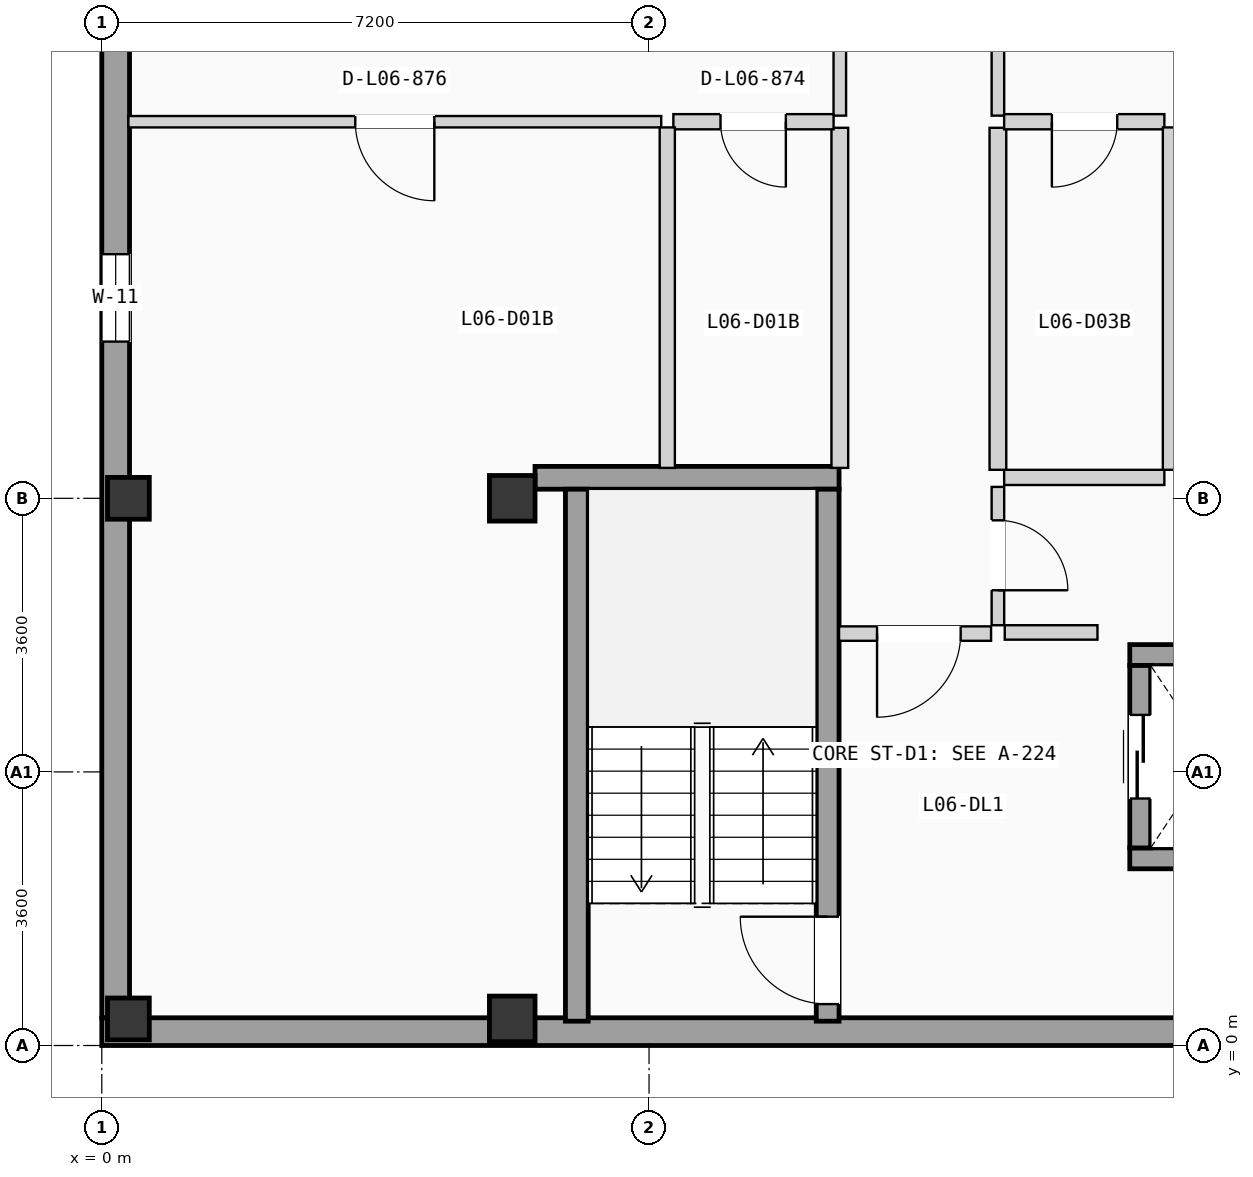
"""IFC4 building model, lengths in metres.
Left out: names, types, materials, properties, quantities, classifications, styles, units other than length and angle.
Written with IfcOpenShell. Run it as: python <this file> out.ifc"""

import sys

from ifc_helpers import new_model, si_unit, direction, frame, frame_2d, origin, origin_2d, place, context, subcontext, project, spatial, rectangle, extrude, element, fill, save


model = new_model("IFC4")
c1 = context("Model", 3, precision=1e-05, world=origin(), true_north=direction((0.0, 1.0)))
c2 = subcontext(c1, "Body", "Model", "MODEL_VIEW")
j1 = project(units=[si_unit("LENGTHUNIT", "METRE"), si_unit("PLANEANGLEUNIT", "RADIAN")], contexts=[c1])
p1 = place(None, origin())
s1 = spatial("IfcSite", under=j1, at=p1, CompositionType="ELEMENT")
p2 = place(p1, origin())
s2 = spatial("IfcBuilding", under=s1, at=p2, CompositionType="ELEMENT")
p3 = place(p2, frame((0.0, 0.0, 21.525)))
s3 = spatial("IfcBuildingStorey", under=s2, at=p3, CompositionType="ELEMENT", Elevation=21.525)
for number, where, z_axis, x_axis in (
    (1, (0.35, 0.35, 0.0), (0.0, 0.0, 1.0), (1.0, 0.0, 0.0)),
    (2, (0.35, 7.2, 0.0), (0.0, 0.0, 1.0), (1.0, 0.0, 0.0)),
):
    element("IfcColumn", number, at=place(p3, frame(where, z_axis=z_axis, x_axis=x_axis)), inside=s3, PredefinedType="COLUMN", context=c2, shape_type="SweptSolid", body=[
        extrude(rectangle(XDim=0.55, YDim=0.55, at=origin_2d()), origin(), (0.0, 0.0, 1.0), 3.15),
    ])
for number, where, z_axis, x_axis in (
    (3, (5.4, 0.35, 0.0), (0.0, 0.0, 1.0), (1.0, 0.0, 0.0)),
    (4, (5.4, 7.2, 0.0), (0.0, 0.0, 1.0), (1.0, 0.0, 0.0)),
):
    element("IfcColumn", number, at=place(p3, frame(where, z_axis=z_axis, x_axis=x_axis)), inside=s3, PredefinedType="COLUMN", context=c2, shape_type="SweptSolid", body=[
        extrude(rectangle(XDim=0.6, YDim=0.6, at=origin_2d()), origin(), (0.0, 0.0, 1.0), 3.15),
    ])
p4 = place(p3, frame((0.0, 0.183, 0.0), z_axis=(0.0, 0.0, 1.0), x_axis=(1.0, 0.0, 0.0)))
e5 = element("IfcWall", 5, at=p4, inside=s3, PredefinedType="SOLIDWALL", context=c2, shape_type="SweptSolid", body=[
    extrude(rectangle(XDim=21.6, YDim=0.365, at=frame_2d((10.8, 0.0))), origin(), (0.0, 0.0, 1.0), 2.89),
])
p5 = place(p3, frame((0.183, 0.365, 0.0), z_axis=(0.0, 0.0, 1.0), x_axis=(0.0, 1.0, 0.0)))
e6 = element("IfcWall", 6, at=p5, inside=s3, PredefinedType="SOLIDWALL", context=c2, shape_type="SweptSolid", body=[
    extrude(rectangle(XDim=49.67, YDim=0.365, at=frame_2d((24.835, 0.0))), origin(), (0.0, 0.0, 1.0), 2.89),
])
p6 = place(p5, frame((15.325, 0.0, 0.85)))
e7 = element("IfcOpeningElement", 7, at=p6, cuts=e6, PredefinedType="OPENING", context=c2, shape_type="SweptSolid", body=[
    extrude(rectangle(XDim=0.95, YDim=1.2, at=frame_2d((0.475, 0.6))), frame((0.0, 0.192, 0.0), z_axis=(0.0, -1.0, 0.0), x_axis=(1.0, 0.0, 0.0)), (0.0, 0.0, 1.0), 0.385),
])
p7 = place(p5, frame((8.897, 0.0, 0.9)))
e8 = element("IfcOpeningElement", 8, at=p7, cuts=e6, PredefinedType="OPENING", context=c2, shape_type="SweptSolid", body=[
    extrude(rectangle(XDim=1.15, YDim=1.2, at=frame_2d((0.575, 0.6))), frame((0.0, 0.192, 0.0), z_axis=(0.0, -1.0, 0.0), x_axis=(1.0, 0.0, 0.0)), (0.0, 0.0, 1.0), 0.385),
])
p8 = place(p5, frame((18.635, 0.0, 0.855)))
e9 = element("IfcOpeningElement", 9, at=p8, cuts=e6, PredefinedType="OPENING", context=c2, shape_type="SweptSolid", body=[
    extrude(rectangle(XDim=1.15, YDim=1.35, at=frame_2d((0.575, 0.675))), frame((0.0, 0.192, 0.0), z_axis=(0.0, -1.0, 0.0), x_axis=(1.0, 0.0, 0.0)), (0.0, 0.0, 1.0), 0.385),
])
p9 = place(p5, frame((31.46, 0.0, 0.705)))
e10 = element("IfcOpeningElement", 10, at=p9, cuts=e6, PredefinedType="OPENING", context=c2, shape_type="SweptSolid", body=[
    extrude(rectangle(XDim=1.15, YDim=1.5, at=frame_2d((0.575, 0.75))), frame((0.0, 0.192, 0.0), z_axis=(0.0, -1.0, 0.0), x_axis=(1.0, 0.0, 0.0)), (0.0, 0.0, 1.0), 0.385),
])
p10 = place(p5, frame((24.562, 0.0, 0.555)))
e11 = element("IfcOpeningElement", 11, at=p10, cuts=e6, PredefinedType="OPENING", context=c2, shape_type="SweptSolid", body=[
    extrude(rectangle(XDim=1.15, YDim=1.65, at=frame_2d((0.575, 0.825))), frame((0.0, 0.192, 0.0), z_axis=(0.0, -1.0, 0.0), x_axis=(1.0, 0.0, 0.0)), (0.0, 0.0, 1.0), 0.385),
])
p11 = place(p5, frame((38.695, 0.0, 0.85)))
e12 = element("IfcOpeningElement", 12, at=p11, cuts=e6, PredefinedType="OPENING", context=c2, shape_type="SweptSolid", body=[
    extrude(rectangle(XDim=0.95, YDim=1.2, at=frame_2d((0.475, 0.6))), frame((0.0, 0.192, 0.0), z_axis=(0.0, -1.0, 0.0), x_axis=(1.0, 0.0, 0.0)), (0.0, 0.0, 1.0), 0.385),
])
p12 = place(p3, frame((5.7, 7.47, 0.0), z_axis=(0.0, 0.0, 1.0), x_axis=(1.0, 0.0, 0.0)))
e13 = element("IfcWall", 13, at=p12, inside=s3, PredefinedType="SHEAR", context=c2, shape_type="SweptSolid", body=[
    extrude(rectangle(XDim=4.0, YDim=0.3, at=frame_2d((2.0, 0.0))), origin(), (0.0, 0.0, 1.0), 2.89),
])
p13 = place(p3, frame((6.25, 0.32, 0.0), z_axis=(0.0, 0.0, 1.0), x_axis=(0.0, 1.0, 0.0)))
e14 = element("IfcWall", 14, at=p13, inside=s3, PredefinedType="SHEAR", context=c2, shape_type="SweptSolid", body=[
    extrude(rectangle(XDim=7.0, YDim=0.3, at=frame_2d((3.5, 0.0))), origin(), (0.0, 0.0, 1.0), 2.89),
])
p14 = place(p3, frame((9.55, 0.32, 0.0), z_axis=(0.0, 0.0, 1.0), x_axis=(0.0, 1.0, 0.0)))
e15 = element("IfcWall", 15, at=p14, inside=s3, PredefinedType="SHEAR", context=c2, shape_type="SweptSolid", body=[
    extrude(rectangle(XDim=7.0, YDim=0.3, at=frame_2d((3.5, 0.0))), origin(), (0.0, 0.0, 1.0), 2.89),
])
p15 = place(p14, frame((0.225, 0.0, 0.0)))
e16 = element("IfcOpeningElement", 16, at=p15, cuts=e15, PredefinedType="OPENING", context=c2, shape_type="SweptSolid", body=[
    extrude(rectangle(XDim=1.15, YDim=2.12, at=frame_2d((0.575, 1.06))), frame((0.0, 0.16, 0.0), z_axis=(0.0, -1.0, 0.0), x_axis=(1.0, 0.0, 0.0)), (0.0, 0.0, 1.0), 0.32),
])
for number, where, z_axis, x_axis in (
    (17, (13.525, 2.462, 0.0), (0.0, 0.0, 1.0), (1.0, 0.0, 0.0)),
    (18, (13.525, 5.137, 0.0), (0.0, 0.0, 1.0), (1.0, 0.0, 0.0)),
):
    element("IfcWall", number, at=place(p3, frame(where, z_axis=z_axis, x_axis=x_axis)), inside=s3, PredefinedType="SHEAR", context=c2, shape_type="SweptSolid", body=[
        extrude(rectangle(XDim=2.15, YDim=0.275, at=frame_2d((1.075, 0.0))), origin(), (0.0, 0.0, 1.0), 2.89),
    ])
p16 = place(p3, frame((13.663, 2.6, 0.0), z_axis=(0.0, 0.0, 1.0), x_axis=(0.0, 1.0, 0.0)))
e19 = element("IfcWall", 19, at=p16, inside=s3, PredefinedType="SHEAR", context=c2, shape_type="SweptSolid", body=[
    extrude(rectangle(XDim=2.4, YDim=0.275, at=frame_2d((1.2, 0.0))), origin(), (0.0, 0.0, 1.0), 2.89),
])
p17 = place(p16, frame((0.65, 0.0, 0.0)))
e20 = element("IfcOpeningElement", 20, at=p17, cuts=e19, PredefinedType="OPENING", context=c2, shape_type="SweptSolid", body=[
    extrude(rectangle(XDim=1.1, YDim=2.15, at=frame_2d((0.55, 1.075))), frame((0.0, 0.147, 0.0), z_axis=(0.0, -1.0, 0.0), x_axis=(1.0, 0.0, 0.0)), (0.0, 0.0, 1.0), 0.295),
])
p18 = place(p3, frame((11.88, 5.435, 0.0), z_axis=(0.0, 0.0, 1.0), x_axis=(1.0, 0.0, 0.0)))
e21 = element("IfcWall", 21, at=p18, inside=s3, PredefinedType="PARTITIONING", context=c2, shape_type="SweptSolid", body=[
    extrude(rectangle(XDim=1.22, YDim=0.19, at=frame_2d((0.61, 0.0))), origin(), (0.0, 0.0, 1.0), 2.87),
])
p19 = place(p3, frame((9.7, 5.42, 0.0), z_axis=(0.0, 0.0, 1.0), x_axis=(1.0, 0.0, 0.0)))
e22 = element("IfcWall", 22, at=p19, inside=s3, PredefinedType="PARTITIONING", context=c2, shape_type="SweptSolid", body=[
    extrude(rectangle(XDim=2.0, YDim=0.19, at=frame_2d((1.0, 0.0))), origin(), (0.0, 0.0, 1.0), 2.87),
])
p20 = place(p19, frame((0.5, 0.0, 0.0)))
e23 = element("IfcOpeningElement", 23, at=p20, cuts=e22, PredefinedType="OPENING", context=c2, shape_type="SweptSolid", body=[
    extrude(rectangle(XDim=1.1, YDim=2.12, at=frame_2d((0.55, 1.06))), frame((0.0, 0.105, 0.0), z_axis=(0.0, -1.0, 0.0), x_axis=(1.0, 0.0, 0.0)), (0.0, 0.0, 1.0), 0.21),
])
p21 = place(p3, frame((11.79, 5.53, 0.0), z_axis=(0.0, 0.0, 1.0), x_axis=(0.0, 1.0, 0.0)))
e24 = element("IfcWall", 24, at=p21, inside=s3, PredefinedType="PARTITIONING", context=c2, shape_type="SweptSolid", body=[
    extrude(rectangle(XDim=1.82, YDim=0.165, at=frame_2d((0.91, 0.0))), origin(), (0.0, 0.0, 1.0), 2.87),
])
p22 = place(p21, frame((0.46, 0.0, 0.0)))
e25 = element("IfcOpeningElement", 25, at=p22, cuts=e24, PredefinedType="OPENING", context=c2, shape_type="SweptSolid", body=[
    extrude(rectangle(XDim=0.92, YDim=2.04, at=frame_2d((0.46, 1.02))), frame((0.0, 0.093, 0.0), z_axis=(0.0, -1.0, 0.0), x_axis=(1.0, 0.0, 0.0)), (0.0, 0.0, 1.0), 0.185),
])
p23 = place(p3, frame((11.872, 7.475, 0.0), z_axis=(0.0, 0.0, 1.0), x_axis=(1.0, 0.0, 0.0)))
e26 = element("IfcWall", 26, at=p23, inside=s3, PredefinedType="PLUMBINGWALL", context=c2, shape_type="SweptSolid", body=[
    extrude(rectangle(XDim=2.108, YDim=0.2, at=frame_2d((1.054, 0.0))), origin(), (0.0, 0.0, 1.0), 2.87),
])
p24 = place(p3, frame((9.71, 12.235, 0.0), z_axis=(0.0, 0.0, 1.0), x_axis=(0.0, 1.0, 0.0)))
e27 = element("IfcWall", 27, at=p24, inside=s3, PredefinedType="PARTITIONING", context=c2, shape_type="SweptSolid", body=[
    extrude(rectangle(XDim=5.424, YDim=0.165, at=frame_2d((2.712, 0.0))), origin(), (0.0, 0.0, 1.0), 2.87),
])
p25 = place(p24, frame((2.187, 0.0, 0.0)))
e28 = element("IfcOpeningElement", 28, at=p25, cuts=e27, PredefinedType="OPENING", context=c2, shape_type="SweptSolid", body=[
    extrude(rectangle(XDim=1.05, YDim=2.13, at=frame_2d((0.525, 1.065))), frame((0.0, 0.093, 0.0), z_axis=(0.0, -1.0, 0.0), x_axis=(1.0, 0.0, 0.0)), (0.0, 0.0, 1.0), 0.185),
])
p26 = place(p3, frame((9.71, 7.6, 0.0), z_axis=(0.0, 0.0, 1.0), x_axis=(0.0, 1.0, 0.0)))
e29 = element("IfcWall", 29, at=p26, inside=s3, PredefinedType="PLUMBINGWALL", context=c2, shape_type="SweptSolid", body=[
    extrude(rectangle(XDim=4.475, YDim=0.22, at=frame_2d((2.237, 0.0))), origin(), (0.0, 0.0, 1.0), 2.87),
])
p27 = place(p3, frame((11.79, 12.235, 0.0), z_axis=(0.0, 0.0, 1.0), x_axis=(0.0, 1.0, 0.0)))
e30 = element("IfcWall", 30, at=p27, inside=s3, PredefinedType="PARTITIONING", context=c2, shape_type="SweptSolid", body=[
    extrude(rectangle(XDim=5.424, YDim=0.165, at=frame_2d((2.712, 0.0))), origin(), (0.0, 0.0, 1.0), 2.87),
])
p28 = place(p27, frame((2.187, 0.0, 0.0)))
e31 = element("IfcOpeningElement", 31, at=p28, cuts=e30, PredefinedType="OPENING", context=c2, shape_type="SweptSolid", body=[
    extrude(rectangle(XDim=1.05, YDim=2.13, at=frame_2d((0.525, 1.065))), frame((0.0, 0.093, 0.0), z_axis=(0.0, -1.0, 0.0), x_axis=(1.0, 0.0, 0.0)), (0.0, 0.0, 1.0), 0.185),
])
p29 = place(p3, frame((11.79, 7.575, 0.0), z_axis=(0.0, 0.0, 1.0), x_axis=(0.0, 1.0, 0.0)))
e32 = element("IfcWall", 32, at=p29, inside=s3, PredefinedType="PLUMBINGWALL", context=c2, shape_type="SweptSolid", body=[
    extrude(rectangle(XDim=4.5, YDim=0.22, at=frame_2d((2.25, 0.0))), origin(), (0.0, 0.0, 1.0), 2.87),
])
p30 = place(p3, frame((7.52, 12.155, 0.0), z_axis=(0.0, 0.0, 1.0), x_axis=(1.0, 0.0, 0.0)))
e33 = element("IfcWall", 33, at=p30, inside=s3, PredefinedType="PLUMBINGWALL", context=c2, shape_type="SweptSolid", body=[
    extrude(rectangle(XDim=2.108, YDim=0.2, at=frame_2d((1.054, 0.0))), origin(), (0.0, 0.0, 1.0), 2.87),
])
p31 = place(p30, frame((0.62, 0.0, 0.0)))
e34 = element("IfcOpeningElement", 34, at=p31, cuts=e33, PredefinedType="OPENING", context=c2, shape_type="SweptSolid", body=[
    extrude(rectangle(XDim=0.86, YDim=2.0, at=frame_2d((0.43, 1.0))), frame((0.0, 0.11, 0.0), z_axis=(0.0, -1.0, 0.0), x_axis=(1.0, 0.0, 0.0)), (0.0, 0.0, 1.0), 0.22),
])
p32 = place(p3, frame((0.35, 12.155, 0.0), z_axis=(0.0, 0.0, 1.0), x_axis=(1.0, 0.0, 0.0)))
e35 = element("IfcWall", 35, at=p32, inside=s3, PredefinedType="PARTITIONING", context=c2, shape_type="SweptSolid", body=[
    extrude(rectangle(XDim=7.01, YDim=0.15, at=frame_2d((3.505, 0.0))), origin(), (0.0, 0.0, 1.0), 2.87),
])
p33 = place(p32, frame((2.985, 0.0, 0.0)))
e36 = element("IfcOpeningElement", 36, at=p33, cuts=e35, PredefinedType="OPENING", context=c2, shape_type="SweptSolid", body=[
    extrude(rectangle(XDim=1.04, YDim=2.08, at=frame_2d((0.52, 1.04))), frame((0.0, 0.085, 0.0), z_axis=(0.0, -1.0, 0.0), x_axis=(1.0, 0.0, 0.0)), (0.0, 0.0, 1.0), 0.17),
])
p34 = place(p3, frame((7.44, 7.6, 0.0), z_axis=(0.0, 0.0, 1.0), x_axis=(0.0, 1.0, 0.0)))
e37 = element("IfcWall", 37, at=p34, inside=s3, PredefinedType="PLUMBINGWALL", context=c2, shape_type="SweptSolid", body=[
    extrude(rectangle(XDim=4.48, YDim=0.2, at=frame_2d((2.24, 0.0))), origin(), (0.0, 0.0, 1.0), 2.87),
])
p35 = place(p3, frame((11.872, 12.155, 0.0), z_axis=(0.0, 0.0, 1.0), x_axis=(1.0, 0.0, 0.0)))
e38 = element("IfcWall", 38, at=p35, inside=s3, PredefinedType="PLUMBINGWALL", context=c2, shape_type="SweptSolid", body=[
    extrude(rectangle(XDim=2.108, YDim=0.2, at=frame_2d((1.054, 0.0))), origin(), (0.0, 0.0, 1.0), 2.87),
])
p36 = place(p35, frame((0.628, 0.0, 0.0)))
e39 = element("IfcOpeningElement", 39, at=p36, cuts=e38, PredefinedType="OPENING", context=c2, shape_type="SweptSolid", body=[
    extrude(rectangle(XDim=0.86, YDim=2.0, at=frame_2d((0.43, 1.0))), frame((0.0, 0.11, 0.0), z_axis=(0.0, -1.0, 0.0), x_axis=(1.0, 0.0, 0.0)), (0.0, 0.0, 1.0), 0.22),
])
p37 = place(p3, frame((14.06, 7.575, 0.0), z_axis=(0.0, 0.0, 1.0), x_axis=(0.0, 1.0, 0.0)))
e40 = element("IfcWall", 40, at=p37, inside=s3, PredefinedType="PLUMBINGWALL", context=c2, shape_type="SweptSolid", body=[
    extrude(rectangle(XDim=4.505, YDim=0.2, at=frame_2d((2.252, 0.0))), origin(), (0.0, 0.0, 1.0), 2.87),
])
p38 = place(p7, origin())
e41 = element("IfcWindow", 41, at=p38, inside=s3, PartitioningType="SINGLE_PANEL", PredefinedType="WINDOW", context=c2, shape_type="SweptSolid", body=[
    extrude(rectangle(XDim=1.15, YDim=1.2, at=frame_2d((0.575, 0.6))), frame((0.0, 0.03, 0.0), z_axis=(0.0, -1.0, 0.0), x_axis=(1.0, 0.0, 0.0)), (0.0, 0.0, 1.0), 0.06),
])
fill(e8, e41)
p39 = place(p15, origin())
e42 = element("IfcDoor", 42, at=p39, inside=s3, OperationType="SINGLE_SWING_RIGHT", PredefinedType="DOOR", context=c2, shape_type="SweptSolid", body=[
    extrude(rectangle(XDim=1.15, YDim=2.12, at=frame_2d((0.575, 1.06))), frame((0.0, 0.025, 0.0), z_axis=(0.0, -1.0, 0.0), x_axis=(1.0, 0.0, 0.0)), (0.0, 0.0, 1.0), 0.05),
])
fill(e16, e42)
p40 = place(p17, origin())
e43 = element("IfcDoor", 43, at=p40, inside=s3, OperationType="SLIDING_TO_LEFT", PredefinedType="DOOR", context=c2, shape_type="SweptSolid", body=[
    extrude(rectangle(XDim=1.1, YDim=2.15, at=frame_2d((0.55, 1.075))), frame((0.0, 0.025, 0.0), z_axis=(0.0, -1.0, 0.0), x_axis=(1.0, 0.0, 0.0)), (0.0, 0.0, 1.0), 0.05),
])
fill(e20, e43)
p41 = place(p20, frame((1.1, 0.0, 0.0), z_axis=(0.0, 0.0, 1.0), x_axis=(-1.0, 0.0, 0.0)))
e44 = element("IfcDoor", 44, at=p41, inside=s3, OperationType="SINGLE_SWING_LEFT", PredefinedType="DOOR", context=c2, shape_type="SweptSolid", body=[
    extrude(rectangle(XDim=1.1, YDim=2.12, at=frame_2d((0.55, 1.06))), frame((0.0, 0.025, 0.0), z_axis=(0.0, -1.0, 0.0), x_axis=(1.0, 0.0, 0.0)), (0.0, 0.0, 1.0), 0.05),
])
fill(e23, e44)
p42 = place(p22, frame((0.92, 0.0, 0.0), z_axis=(0.0, 0.0, 1.0), x_axis=(-1.0, 0.0, 0.0)))
e45 = element("IfcDoor", 45, at=p42, inside=s3, OperationType="SINGLE_SWING_LEFT", PredefinedType="DOOR", context=c2, shape_type="SweptSolid", body=[
    extrude(rectangle(XDim=0.92, YDim=2.04, at=frame_2d((0.46, 1.02))), frame((0.0, 0.025, 0.0), z_axis=(0.0, -1.0, 0.0), x_axis=(1.0, 0.0, 0.0)), (0.0, 0.0, 1.0), 0.05),
])
fill(e25, e45)
p43 = place(p31, frame((0.86, 0.0, 0.0), z_axis=(0.0, 0.0, 1.0), x_axis=(-1.0, 0.0, 0.0)))
e46 = element("IfcDoor", 46, at=p43, inside=s3, OperationType="SINGLE_SWING_RIGHT", PredefinedType="DOOR", context=c2, shape_type="SweptSolid", body=[
    extrude(rectangle(XDim=0.86, YDim=2.0, at=frame_2d((0.43, 1.0))), frame((0.0, 0.025, 0.0), z_axis=(0.0, -1.0, 0.0), x_axis=(1.0, 0.0, 0.0)), (0.0, 0.0, 1.0), 0.05),
])
fill(e34, e46)
p44 = place(p33, frame((1.04, 0.0, 0.0), z_axis=(0.0, 0.0, 1.0), x_axis=(-1.0, 0.0, 0.0)))
e47 = element("IfcDoor", 47, at=p44, inside=s3, OperationType="SINGLE_SWING_RIGHT", PredefinedType="DOOR", context=c2, shape_type="SweptSolid", body=[
    extrude(rectangle(XDim=1.04, YDim=2.08, at=frame_2d((0.52, 1.04))), frame((0.0, 0.025, 0.0), z_axis=(0.0, -1.0, 0.0), x_axis=(1.0, 0.0, 0.0)), (0.0, 0.0, 1.0), 0.05),
])
fill(e36, e47)
p45 = place(p36, frame((0.86, 0.0, 0.0), z_axis=(0.0, 0.0, 1.0), x_axis=(-1.0, 0.0, 0.0)))
e48 = element("IfcDoor", 48, at=p45, inside=s3, OperationType="SINGLE_SWING_LEFT", PredefinedType="DOOR", context=c2, shape_type="SweptSolid", body=[
    extrude(rectangle(XDim=0.86, YDim=2.0, at=frame_2d((0.43, 1.0))), frame((0.0, 0.025, 0.0), z_axis=(0.0, -1.0, 0.0), x_axis=(1.0, 0.0, 0.0)), (0.0, 0.0, 1.0), 0.05),
])
fill(e39, e48)
save(model, sys.argv[1])
